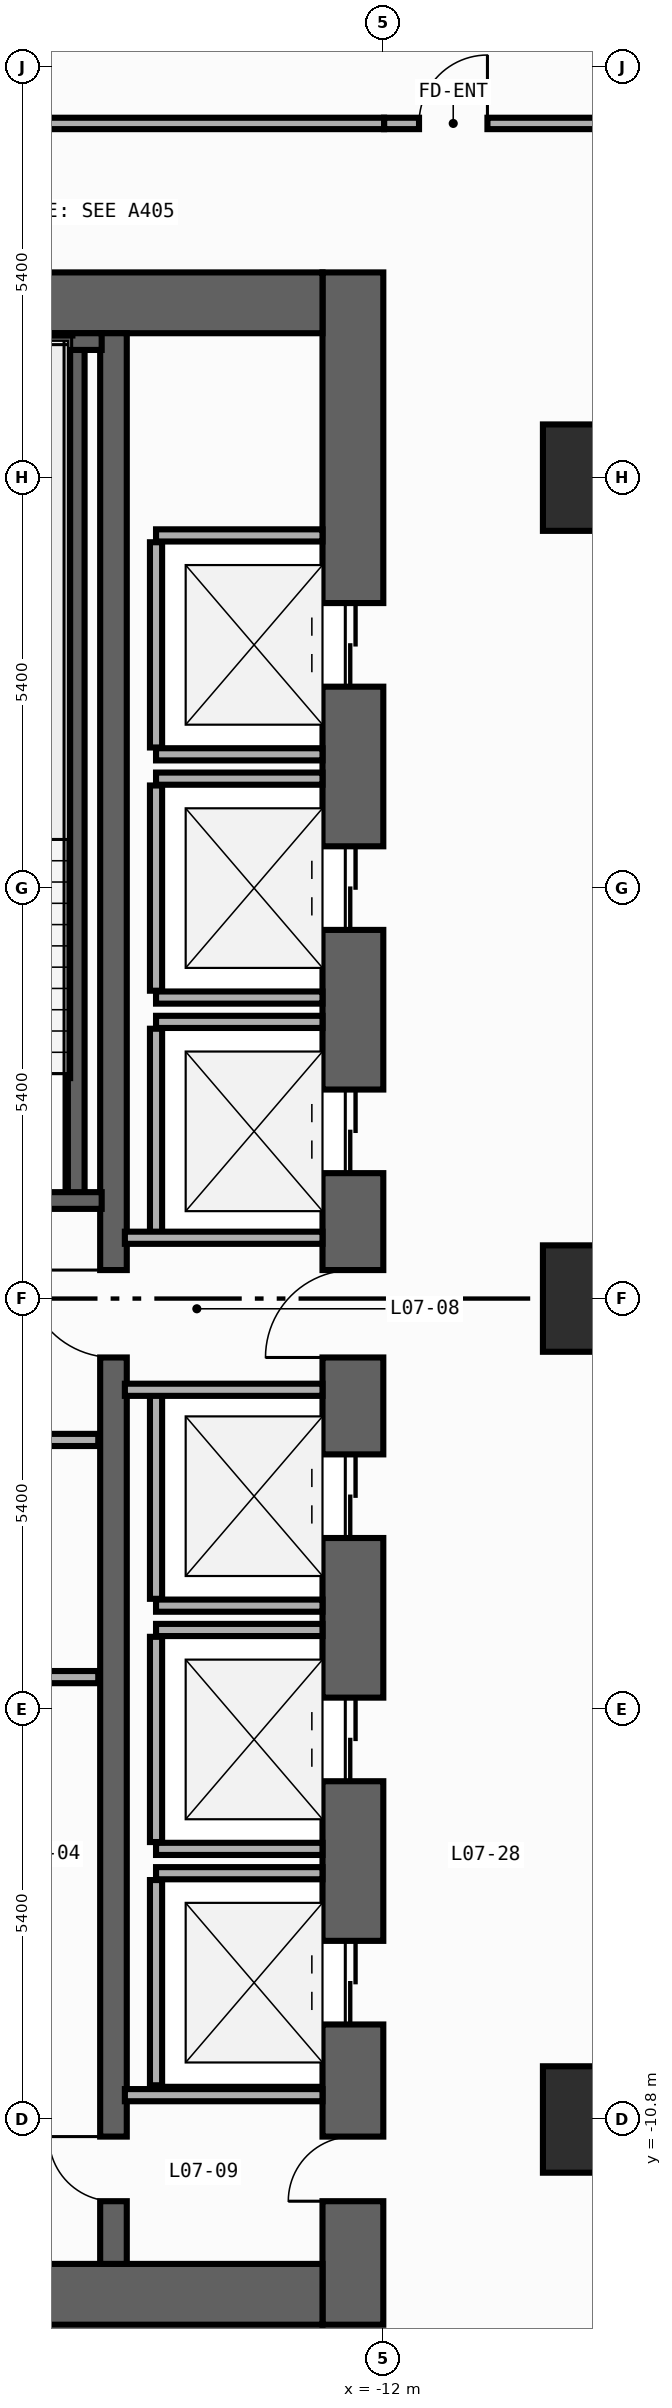
"""IFC4 building model, lengths in metres.
Left out: names, types, materials, properties, quantities, classifications, styles, units other than length and angle.
Written with IfcOpenShell. Run it as: python <this file> out.ifc"""

import sys

from ifc_helpers import new_model, si_unit, direction, frame, frame_2d, origin, origin_2d, place, context, subcontext, project, spatial, rectangle, extrude, element, fill, save


model = new_model("IFC4")
c1 = context("Model", 3, precision=1e-05, world=origin(), true_north=direction((0.0, 1.0)))
c2 = subcontext(c1, "Body", "Model", "MODEL_VIEW")
j1 = project(units=[si_unit("LENGTHUNIT", "METRE"), si_unit("PLANEANGLEUNIT", "RADIAN")], contexts=[c1])
p1 = place(None, origin())
s1 = spatial("IfcSite", under=j1, at=p1, CompositionType="ELEMENT")
p2 = place(p1, origin())
s2 = spatial("IfcBuilding", under=s1, at=p2, CompositionType="ELEMENT")
p3 = place(p2, frame((0.0, 0.0, 30.2)))
s3 = spatial("IfcBuildingStorey", under=s2, at=p3, CompositionType="ELEMENT", Elevation=30.2)
p4 = place(p3, frame((-12.4, -13.5, 0.0), z_axis=(0.0, 0.0, 1.0), x_axis=(0.0, 1.0, 0.0)))
e1 = element("IfcWall", 1, at=p4, inside=s3, PredefinedType="SHEAR", context=c2, shape_type="SweptSolid", body=[
    extrude(rectangle(XDim=27.0, YDim=0.8, at=frame_2d((13.5, 0.0))), origin(), (0.0, 0.0, 1.0), 3.94),
])
p5 = place(p4, frame((21.55, 0.0, 0.0)))
e2 = element("IfcOpeningElement", 2, at=p5, cuts=e1, PredefinedType="OPENING", context=c2, shape_type="SweptSolid", body=[
    extrude(rectangle(XDim=1.1, YDim=2.2, at=frame_2d((0.55, 1.1))), frame((0.0, 0.41, 0.0), z_axis=(0.0, -1.0, 0.0), x_axis=(1.0, 0.0, 0.0)), (0.0, 0.0, 1.0), 0.82),
])
p6 = place(p4, frame((18.35, 0.0, 0.0)))
e3 = element("IfcOpeningElement", 3, at=p6, cuts=e1, PredefinedType="OPENING", context=c2, shape_type="SweptSolid", body=[
    extrude(rectangle(XDim=1.1, YDim=2.2, at=frame_2d((0.55, 1.1))), frame((0.0, 0.41, 0.0), z_axis=(0.0, -1.0, 0.0), x_axis=(1.0, 0.0, 0.0)), (0.0, 0.0, 1.0), 0.82),
])
p7 = place(p4, frame((15.15, 0.0, 0.0)))
e4 = element("IfcOpeningElement", 4, at=p7, cuts=e1, PredefinedType="OPENING", context=c2, shape_type="SweptSolid", body=[
    extrude(rectangle(XDim=1.1, YDim=2.2, at=frame_2d((0.55, 1.1))), frame((0.0, 0.41, 0.0), z_axis=(0.0, -1.0, 0.0), x_axis=(1.0, 0.0, 0.0)), (0.0, 0.0, 1.0), 0.82),
])
p8 = place(p4, frame((10.35, 0.0, 0.0)))
e5 = element("IfcOpeningElement", 5, at=p8, cuts=e1, PredefinedType="OPENING", context=c2, shape_type="SweptSolid", body=[
    extrude(rectangle(XDim=1.1, YDim=2.2, at=frame_2d((0.55, 1.1))), frame((0.0, 0.41, 0.0), z_axis=(0.0, -1.0, 0.0), x_axis=(1.0, 0.0, 0.0)), (0.0, 0.0, 1.0), 0.82),
])
p9 = place(p4, frame((7.15, 0.0, 0.0)))
e6 = element("IfcOpeningElement", 6, at=p9, cuts=e1, PredefinedType="OPENING", context=c2, shape_type="SweptSolid", body=[
    extrude(rectangle(XDim=1.1, YDim=2.2, at=frame_2d((0.55, 1.1))), frame((0.0, 0.41, 0.0), z_axis=(0.0, -1.0, 0.0), x_axis=(1.0, 0.0, 0.0)), (0.0, 0.0, 1.0), 0.82),
])
p10 = place(p4, frame((3.95, 0.0, 0.0)))
e7 = element("IfcOpeningElement", 7, at=p10, cuts=e1, PredefinedType="OPENING", context=c2, shape_type="SweptSolid", body=[
    extrude(rectangle(XDim=1.1, YDim=2.2, at=frame_2d((0.55, 1.1))), frame((0.0, 0.41, 0.0), z_axis=(0.0, -1.0, 0.0), x_axis=(1.0, 0.0, 0.0)), (0.0, 0.0, 1.0), 0.82),
])
p11 = place(p4, frame((12.725, 0.0, 0.0)))
e8 = element("IfcOpeningElement", 8, at=p11, cuts=e1, PredefinedType="OPENING", context=c2, shape_type="SweptSolid", body=[
    extrude(rectangle(XDim=1.15, YDim=2.2, at=frame_2d((0.575, 1.1))), frame((0.0, 0.41, 0.0), z_axis=(0.0, -1.0, 0.0), x_axis=(1.0, 0.0, 0.0)), (0.0, 0.0, 1.0), 0.82),
])
p12 = place(p4, frame((1.625, 0.0, 0.0)))
e9 = element("IfcOpeningElement", 9, at=p12, cuts=e1, PredefinedType="OPENING", context=c2, shape_type="SweptSolid", body=[
    extrude(rectangle(XDim=0.85, YDim=2.1, at=frame_2d((0.425, 1.05))), frame((0.0, 0.41, 0.0), z_axis=(0.0, -1.0, 0.0), x_axis=(1.0, 0.0, 0.0)), (0.0, 0.0, 1.0), 0.82),
])
for number, where, z_axis, x_axis in (
    (10, (-19.6, -13.1, 0.0), (0.0, 0.0, 1.0), (1.0, 0.0, 0.0)),
    (11, (-19.6, 13.1, 0.0), (0.0, 0.0, 1.0), (1.0, 0.0, 0.0)),
):
    element("IfcWall", number, at=place(p3, frame(where, z_axis=z_axis, x_axis=x_axis)), inside=s3, PredefinedType="SHEAR", context=c2, shape_type="SweptSolid", body=[
        extrude(rectangle(XDim=6.8, YDim=0.8, at=frame_2d((3.4, 0.0))), origin(), (0.0, 0.0, 1.0), 3.94),
    ])
p13 = place(p3, frame((-15.55, -12.7, 0.0), z_axis=(0.0, 0.0, 1.0), x_axis=(0.0, 1.0, 0.0)))
e12 = element("IfcWall", 12, at=p13, inside=s3, PredefinedType="SHEAR", context=c2, shape_type="SweptSolid", body=[
    extrude(rectangle(XDim=25.4, YDim=0.35, at=frame_2d((12.7, 0.0))), origin(), (0.0, 0.0, 1.0), 3.94),
])
p14 = place(p13, frame((11.925, 0.0, 0.0)))
e13 = element("IfcOpeningElement", 13, at=p14, cuts=e12, PredefinedType="OPENING", context=c2, shape_type="SweptSolid", body=[
    extrude(rectangle(XDim=1.15, YDim=2.2, at=frame_2d((0.575, 1.1))), frame((0.0, 0.185, 0.0), z_axis=(0.0, -1.0, 0.0), x_axis=(1.0, 0.0, 0.0)), (0.0, 0.0, 1.0), 0.37),
])
p15 = place(p13, frame((0.825, 0.0, 0.0)))
e14 = element("IfcOpeningElement", 14, at=p15, cuts=e12, PredefinedType="OPENING", context=c2, shape_type="SweptSolid", body=[
    extrude(rectangle(XDim=0.85, YDim=2.1, at=frame_2d((0.425, 1.05))), frame((0.0, 0.185, 0.0), z_axis=(0.0, -1.0, 0.0), x_axis=(1.0, 0.0, 0.0)), (0.0, 0.0, 1.0), 0.37),
])
p16 = place(p3, frame((-16.04, 1.29, 0.0), z_axis=(0.0, 0.0, 1.0), x_axis=(0.0, 1.0, 0.0)))
e15 = element("IfcWall", 15, at=p16, inside=s3, PredefinedType="SHEAR", context=c2, shape_type="SweptSolid", body=[
    extrude(rectangle(XDim=11.3, YDim=0.22, at=frame_2d((5.65, 0.0))), origin(), (0.0, 0.0, 1.0), 3.94),
])
p17 = place(p3, frame((-19.62, 12.59, 0.0), z_axis=(0.0, 0.0, 1.0), x_axis=(1.0, 0.0, 0.0)))
e16 = element("IfcWall", 16, at=p17, inside=s3, PredefinedType="SHEAR", context=c2, shape_type="SweptSolid", body=[
    extrude(rectangle(XDim=3.915, YDim=0.22, at=frame_2d((1.958, 0.0))), origin(), (0.0, 0.0, 1.0), 3.94),
])
p18 = place(p3, frame((-19.62, 1.29, 0.0), z_axis=(0.0, 0.0, 1.0), x_axis=(1.0, 0.0, 0.0)))
e17 = element("IfcWall", 17, at=p18, inside=s3, PredefinedType="SHEAR", context=c2, shape_type="SweptSolid", body=[
    extrude(rectangle(XDim=3.915, YDim=0.22, at=frame_2d((1.958, 0.0))), origin(), (0.0, 0.0, 1.0), 3.94),
])
p19 = place(p18, frame((1.08, 0.0, 0.0)))
e18 = element("IfcOpeningElement", 18, at=p19, cuts=e17, PredefinedType="OPENING", context=c2, shape_type="SweptSolid", body=[
    extrude(rectangle(XDim=1.1, YDim=2.2, at=frame_2d((0.55, 1.1))), frame((0.0, 0.12, 0.0), z_axis=(0.0, -1.0, 0.0), x_axis=(1.0, 0.0, 0.0)), (0.0, 0.0, 1.0), 0.24),
])
for number, where, z_axis, x_axis in (
    (19, (-9.2, -10.8, 0.0), (0.0, 0.0, 1.0), (1.0, 0.0, 0.0)),
    (20, (-9.2, 0.0, 0.0), (0.0, 0.0, 1.0), (1.0, 0.0, 0.0)),
    (21, (-9.2, 10.8, 0.0), (0.0, 0.0, 1.0), (1.0, 0.0, 0.0)),
):
    element("IfcColumn", number, at=place(p3, frame(where, z_axis=z_axis, x_axis=x_axis)), inside=s3, PredefinedType="COLUMN", context=c2, shape_type="SweptSolid", body=[
        extrude(rectangle(XDim=1.4, YDim=1.4, at=origin_2d()), origin(), (0.0, 0.0, 1.0), 4.2),
    ])
for number, where, z_axis, x_axis in (
    (22, (-14.99, 7.16, 0.0), (0.0, 0.0, 1.0), (1.0, 0.0, 0.0)),
    (23, (-14.99, 10.04, 0.0), (0.0, 0.0, 1.0), (1.0, 0.0, 0.0)),
):
    element("IfcWall", number, at=place(p3, frame(where, z_axis=z_axis, x_axis=x_axis)), inside=s3, PredefinedType="STANDARD", context=c2, shape_type="SweptSolid", body=[
        extrude(rectangle(XDim=2.19, YDim=0.16, at=frame_2d((1.095, 0.0))), origin(), (0.0, 0.0, 1.0), 3.94),
    ])
p20 = place(p3, frame((-14.99, 7.25, 0.0), z_axis=(0.0, 0.0, 1.0), x_axis=(0.0, 1.0, 0.0)))
e24 = element("IfcWall", 24, at=p20, inside=s3, PredefinedType="STANDARD", context=c2, shape_type="SweptSolid", body=[
    extrude(rectangle(XDim=2.7, YDim=0.16, at=frame_2d((1.35, 0.0))), origin(), (0.0, 0.0, 1.0), 3.94),
])
for number, where, z_axis, x_axis in (
    (25, (-14.99, 3.96, 0.0), (0.0, 0.0, 1.0), (1.0, 0.0, 0.0)),
    (26, (-14.99, 6.84, 0.0), (0.0, 0.0, 1.0), (1.0, 0.0, 0.0)),
):
    element("IfcWall", number, at=place(p3, frame(where, z_axis=z_axis, x_axis=x_axis)), inside=s3, PredefinedType="STANDARD", context=c2, shape_type="SweptSolid", body=[
        extrude(rectangle(XDim=2.19, YDim=0.16, at=frame_2d((1.095, 0.0))), origin(), (0.0, 0.0, 1.0), 3.94),
    ])
p21 = place(p3, frame((-14.99, 4.05, 0.0), z_axis=(0.0, 0.0, 1.0), x_axis=(0.0, 1.0, 0.0)))
e27 = element("IfcWall", 27, at=p21, inside=s3, PredefinedType="STANDARD", context=c2, shape_type="SweptSolid", body=[
    extrude(rectangle(XDim=2.7, YDim=0.16, at=frame_2d((1.35, 0.0))), origin(), (0.0, 0.0, 1.0), 3.94),
])
p22 = place(p3, frame((-14.99, 3.64, 0.0), z_axis=(0.0, 0.0, 1.0), x_axis=(1.0, 0.0, 0.0)))
e28 = element("IfcWall", 28, at=p22, inside=s3, PredefinedType="STANDARD", context=c2, shape_type="SweptSolid", body=[
    extrude(rectangle(XDim=2.19, YDim=0.16, at=frame_2d((1.095, 0.0))), origin(), (0.0, 0.0, 1.0), 3.94),
])
p23 = place(p3, frame((-14.99, 0.85, 0.0), z_axis=(0.0, 0.0, 1.0), x_axis=(0.0, 1.0, 0.0)))
e29 = element("IfcWall", 29, at=p23, inside=s3, PredefinedType="STANDARD", context=c2, shape_type="SweptSolid", body=[
    extrude(rectangle(XDim=2.7, YDim=0.16, at=frame_2d((1.35, 0.0))), origin(), (0.0, 0.0, 1.0), 3.94),
])
p24 = place(p3, frame((-14.99, -4.04, 0.0), z_axis=(0.0, 0.0, 1.0), x_axis=(1.0, 0.0, 0.0)))
e30 = element("IfcWall", 30, at=p24, inside=s3, PredefinedType="STANDARD", context=c2, shape_type="SweptSolid", body=[
    extrude(rectangle(XDim=2.19, YDim=0.16, at=frame_2d((1.095, 0.0))), origin(), (0.0, 0.0, 1.0), 3.94),
])
p25 = place(p3, frame((-14.99, -3.95, 0.0), z_axis=(0.0, 0.0, 1.0), x_axis=(0.0, 1.0, 0.0)))
e31 = element("IfcWall", 31, at=p25, inside=s3, PredefinedType="STANDARD", context=c2, shape_type="SweptSolid", body=[
    extrude(rectangle(XDim=2.7, YDim=0.16, at=frame_2d((1.35, 0.0))), origin(), (0.0, 0.0, 1.0), 3.94),
])
for number, where, z_axis, x_axis in (
    (32, (-14.99, -7.24, 0.0), (0.0, 0.0, 1.0), (1.0, 0.0, 0.0)),
    (33, (-14.99, -4.36, 0.0), (0.0, 0.0, 1.0), (1.0, 0.0, 0.0)),
):
    element("IfcWall", number, at=place(p3, frame(where, z_axis=z_axis, x_axis=x_axis)), inside=s3, PredefinedType="STANDARD", context=c2, shape_type="SweptSolid", body=[
        extrude(rectangle(XDim=2.19, YDim=0.16, at=frame_2d((1.095, 0.0))), origin(), (0.0, 0.0, 1.0), 3.94),
    ])
p26 = place(p3, frame((-14.99, -7.15, 0.0), z_axis=(0.0, 0.0, 1.0), x_axis=(0.0, 1.0, 0.0)))
e34 = element("IfcWall", 34, at=p26, inside=s3, PredefinedType="STANDARD", context=c2, shape_type="SweptSolid", body=[
    extrude(rectangle(XDim=2.7, YDim=0.16, at=frame_2d((1.35, 0.0))), origin(), (0.0, 0.0, 1.0), 3.94),
])
p27 = place(p3, frame((-14.99, -7.56, 0.0), z_axis=(0.0, 0.0, 1.0), x_axis=(1.0, 0.0, 0.0)))
e35 = element("IfcWall", 35, at=p27, inside=s3, PredefinedType="STANDARD", context=c2, shape_type="SweptSolid", body=[
    extrude(rectangle(XDim=2.19, YDim=0.16, at=frame_2d((1.095, 0.0))), origin(), (0.0, 0.0, 1.0), 3.94),
])
p28 = place(p3, frame((-14.99, -10.35, 0.0), z_axis=(0.0, 0.0, 1.0), x_axis=(0.0, 1.0, 0.0)))
e36 = element("IfcWall", 36, at=p28, inside=s3, PredefinedType="STANDARD", context=c2, shape_type="SweptSolid", body=[
    extrude(rectangle(XDim=2.7, YDim=0.16, at=frame_2d((1.35, 0.0))), origin(), (0.0, 0.0, 1.0), 3.94),
])
p29 = place(p3, frame((-19.55, -1.86, 0.0), z_axis=(0.0, 0.0, 1.0), x_axis=(1.0, 0.0, 0.0)))
e37 = element("IfcWall", 37, at=p29, inside=s3, PredefinedType="STANDARD", context=c2, shape_type="SweptSolid", body=[
    extrude(rectangle(XDim=3.8, YDim=0.16, at=frame_2d((1.9, 0.0))), origin(), (0.0, 0.0, 1.0), 3.94),
])
p30 = place(p29, frame((1.18, 0.0, 0.0)))
e38 = element("IfcOpeningElement", 38, at=p30, cuts=e37, PredefinedType="OPENING", context=c2, shape_type="SweptSolid", body=[
    extrude(rectangle(XDim=1.15, YDim=2.2, at=frame_2d((0.575, 1.1))), frame((0.0, 0.09, 0.0), z_axis=(0.0, -1.0, 0.0), x_axis=(1.0, 0.0, 0.0)), (0.0, 0.0, 1.0), 0.18),
])
p31 = place(p3, frame((-19.55, -4.98, 0.0), z_axis=(0.0, 0.0, 1.0), x_axis=(1.0, 0.0, 0.0)))
e39 = element("IfcWall", 39, at=p31, inside=s3, PredefinedType="STANDARD", context=c2, shape_type="SweptSolid", body=[
    extrude(rectangle(XDim=3.8, YDim=0.16, at=frame_2d((1.9, 0.0))), origin(), (0.0, 0.0, 1.0), 3.94),
])
for number, where, z_axis, x_axis in (
    (40, (-15.4, 0.8, 0.0), (0.0, 0.0, 1.0), (1.0, 0.0, 0.0)),
    (41, (-15.4, -1.2, 0.0), (0.0, 0.0, 1.0), (1.0, 0.0, 0.0)),
    (42, (-15.4, -10.48, 0.0), (0.0, 0.0, 1.0), (1.0, 0.0, 0.0)),
):
    element("IfcWall", number, at=place(p3, frame(where, z_axis=z_axis, x_axis=x_axis)), inside=s3, PredefinedType="STANDARD", context=c2, shape_type="SweptSolid", body=[
        extrude(rectangle(XDim=2.6, YDim=0.16, at=frame_2d((1.3, 0.0))), origin(), (0.0, 0.0, 1.0), 3.94),
    ])
p32 = place(p3, frame((-11.99, 15.46, 0.0), z_axis=(0.0, 0.0, 1.0), x_axis=(1.0, 0.0, 0.0)))
e43 = element("IfcWall", 43, at=p32, inside=s3, PredefinedType="PARTITIONING", context=c2, shape_type="SweptSolid", body=[
    extrude(rectangle(XDim=3.35, YDim=0.15, at=frame_2d((1.675, 0.0))), origin(), (0.0, 0.0, 1.0), 3.94),
])
p33 = place(p32, frame((0.46, 0.0, 0.0)))
e44 = element("IfcOpeningElement", 44, at=p33, cuts=e43, PredefinedType="OPENING", context=c2, shape_type="SweptSolid", body=[
    extrude(rectangle(XDim=0.9, YDim=2.15, at=frame_2d((0.45, 1.075))), frame((0.0, 0.085, 0.0), z_axis=(0.0, -1.0, 0.0), x_axis=(1.0, 0.0, 0.0)), (0.0, 0.0, 1.0), 0.17),
])
p34 = place(p3, frame((-20.64, 15.46, 0.0), z_axis=(0.0, 0.0, 1.0), x_axis=(1.0, 0.0, 0.0)))
e45 = element("IfcWall", 45, at=p34, inside=s3, PredefinedType="PARTITIONING", context=c2, shape_type="SweptSolid", body=[
    extrude(rectangle(XDim=8.65, YDim=0.15, at=frame_2d((4.325, 0.0))), origin(), (0.0, 0.0, 1.0), 3.94),
])
p35 = place(p34, frame((2.871, 0.0, 0.0)))
e46 = element("IfcOpeningElement", 46, at=p35, cuts=e45, PredefinedType="OPENING", context=c2, shape_type="SweptSolid", body=[
    extrude(rectangle(XDim=0.9, YDim=2.15, at=frame_2d((0.45, 1.075))), frame((0.0, 0.085, 0.0), z_axis=(0.0, -1.0, 0.0), x_axis=(1.0, 0.0, 0.0)), (0.0, 0.0, 1.0), 0.17),
])
p36 = place(p5, origin())
e47 = element("IfcDoor", 47, at=p36, inside=s3, OperationType="DOUBLE_DOOR_SLIDING", PredefinedType="DOOR", context=c2, shape_type="SweptSolid", body=[
    extrude(rectangle(XDim=1.1, YDim=2.2, at=frame_2d((0.55, 1.1))), frame((0.0, 0.025, 0.0), z_axis=(0.0, -1.0, 0.0), x_axis=(1.0, 0.0, 0.0)), (0.0, 0.0, 1.0), 0.05),
])
fill(e2, e47)
p37 = place(p6, origin())
e48 = element("IfcDoor", 48, at=p37, inside=s3, OperationType="DOUBLE_DOOR_SLIDING", PredefinedType="DOOR", context=c2, shape_type="SweptSolid", body=[
    extrude(rectangle(XDim=1.1, YDim=2.2, at=frame_2d((0.55, 1.1))), frame((0.0, 0.025, 0.0), z_axis=(0.0, -1.0, 0.0), x_axis=(1.0, 0.0, 0.0)), (0.0, 0.0, 1.0), 0.05),
])
fill(e3, e48)
p38 = place(p7, origin())
e49 = element("IfcDoor", 49, at=p38, inside=s3, OperationType="DOUBLE_DOOR_SLIDING", PredefinedType="DOOR", context=c2, shape_type="SweptSolid", body=[
    extrude(rectangle(XDim=1.1, YDim=2.2, at=frame_2d((0.55, 1.1))), frame((0.0, 0.025, 0.0), z_axis=(0.0, -1.0, 0.0), x_axis=(1.0, 0.0, 0.0)), (0.0, 0.0, 1.0), 0.05),
])
fill(e4, e49)
p39 = place(p8, origin())
e50 = element("IfcDoor", 50, at=p39, inside=s3, OperationType="DOUBLE_DOOR_SLIDING", PredefinedType="DOOR", context=c2, shape_type="SweptSolid", body=[
    extrude(rectangle(XDim=1.1, YDim=2.2, at=frame_2d((0.55, 1.1))), frame((0.0, 0.025, 0.0), z_axis=(0.0, -1.0, 0.0), x_axis=(1.0, 0.0, 0.0)), (0.0, 0.0, 1.0), 0.05),
])
fill(e5, e50)
p40 = place(p9, origin())
e51 = element("IfcDoor", 51, at=p40, inside=s3, OperationType="DOUBLE_DOOR_SLIDING", PredefinedType="DOOR", context=c2, shape_type="SweptSolid", body=[
    extrude(rectangle(XDim=1.1, YDim=2.2, at=frame_2d((0.55, 1.1))), frame((0.0, 0.025, 0.0), z_axis=(0.0, -1.0, 0.0), x_axis=(1.0, 0.0, 0.0)), (0.0, 0.0, 1.0), 0.05),
])
fill(e6, e51)
p41 = place(p10, origin())
e52 = element("IfcDoor", 52, at=p41, inside=s3, OperationType="DOUBLE_DOOR_SLIDING", PredefinedType="DOOR", context=c2, shape_type="SweptSolid", body=[
    extrude(rectangle(XDim=1.1, YDim=2.2, at=frame_2d((0.55, 1.1))), frame((0.0, 0.025, 0.0), z_axis=(0.0, -1.0, 0.0), x_axis=(1.0, 0.0, 0.0)), (0.0, 0.0, 1.0), 0.05),
])
fill(e7, e52)
p42 = place(p11, origin())
e53 = element("IfcDoor", 53, at=p42, inside=s3, OperationType="SINGLE_SWING_LEFT", PredefinedType="DOOR", context=c2, shape_type="SweptSolid", body=[
    extrude(rectangle(XDim=1.15, YDim=2.2, at=frame_2d((0.575, 1.1))), frame((0.0, 0.025, 0.0), z_axis=(0.0, -1.0, 0.0), x_axis=(1.0, 0.0, 0.0)), (0.0, 0.0, 1.0), 0.05),
])
fill(e8, e53)
p43 = place(p14, origin())
e54 = element("IfcDoor", 54, at=p43, inside=s3, OperationType="SINGLE_SWING_RIGHT", PredefinedType="DOOR", context=c2, shape_type="SweptSolid", body=[
    extrude(rectangle(XDim=1.15, YDim=2.2, at=frame_2d((0.575, 1.1))), frame((0.0, 0.025, 0.0), z_axis=(0.0, -1.0, 0.0), x_axis=(1.0, 0.0, 0.0)), (0.0, 0.0, 1.0), 0.05),
])
fill(e13, e54)
p44 = place(p12, origin())
e55 = element("IfcDoor", 55, at=p44, inside=s3, OperationType="SINGLE_SWING_LEFT", PredefinedType="DOOR", context=c2, shape_type="SweptSolid", body=[
    extrude(rectangle(XDim=0.85, YDim=2.1, at=frame_2d((0.425, 1.05))), frame((0.0, 0.025, 0.0), z_axis=(0.0, -1.0, 0.0), x_axis=(1.0, 0.0, 0.0)), (0.0, 0.0, 1.0), 0.05),
])
fill(e9, e55)
p45 = place(p15, origin())
e56 = element("IfcDoor", 56, at=p45, inside=s3, OperationType="SINGLE_SWING_RIGHT", PredefinedType="DOOR", context=c2, shape_type="SweptSolid", body=[
    extrude(rectangle(XDim=0.85, YDim=2.1, at=frame_2d((0.425, 1.05))), frame((0.0, 0.025, 0.0), z_axis=(0.0, -1.0, 0.0), x_axis=(1.0, 0.0, 0.0)), (0.0, 0.0, 1.0), 0.05),
])
fill(e14, e56)
p46 = place(p33, origin())
e57 = element("IfcDoor", 57, at=p46, inside=s3, OperationType="SINGLE_SWING_RIGHT", PredefinedType="DOOR", context=c2, shape_type="SweptSolid", body=[
    extrude(rectangle(XDim=0.9, YDim=2.15, at=frame_2d((0.45, 1.075))), frame((0.0, 0.025, 0.0), z_axis=(0.0, -1.0, 0.0), x_axis=(1.0, 0.0, 0.0)), (0.0, 0.0, 1.0), 0.05),
])
fill(e44, e57)
save(model, sys.argv[1])
